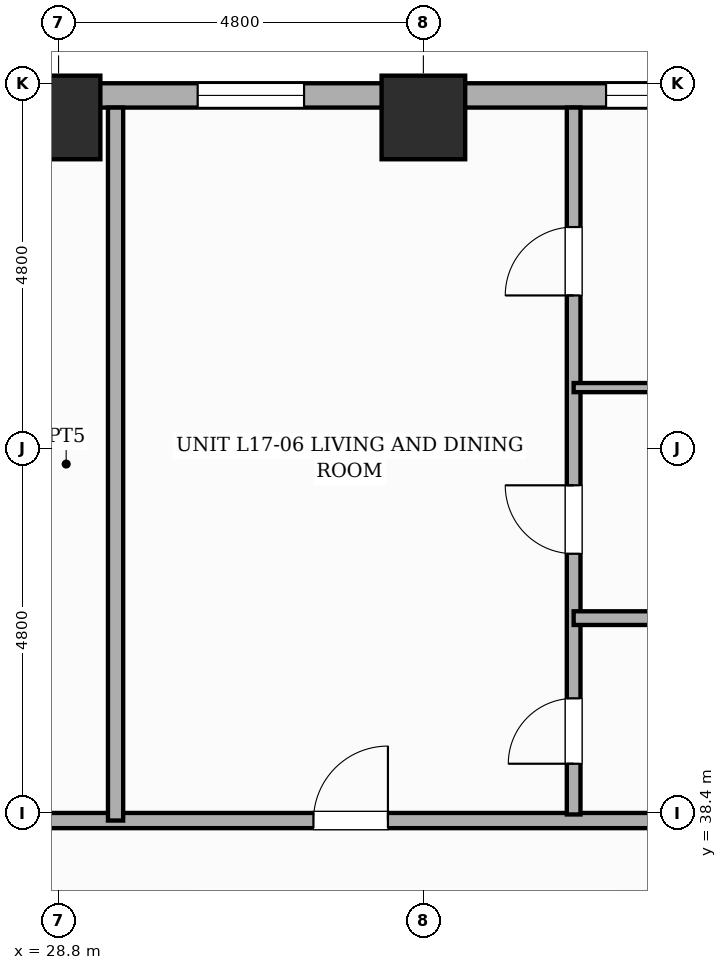
"""IFC4 building model, lengths in metres.
Left out: names, types, materials, properties, quantities, classifications, styles, units other than length and angle.
Written with IfcOpenShell. Run it as: python <this file> out.ifc"""

import sys

from ifc_helpers import new_model, si_unit, direction, frame, frame_2d, origin, origin_2d, place, context, subcontext, project, spatial, rectangle, extrude, element, fill, save


model = new_model("IFC4")
c1 = context("Model", 3, precision=1e-05, world=origin(), true_north=direction((0.0, 1.0)))
c2 = subcontext(c1, "Body", "Model", "MODEL_VIEW")
j1 = project(units=[si_unit("LENGTHUNIT", "METRE"), si_unit("PLANEANGLEUNIT", "RADIAN")], contexts=[c1])
p1 = place(None, origin())
s1 = spatial("IfcSite", under=j1, at=p1, CompositionType="ELEMENT")
p2 = place(p1, origin())
s2 = spatial("IfcBuilding", under=s1, at=p2, CompositionType="ELEMENT")
p3 = place(p2, frame((0.0, 0.0, 68.2)))
s3 = spatial("IfcBuildingStorey", under=s2, at=p3, CompositionType="ELEMENT", Elevation=68.2)
for number, where, z_axis, x_axis in (
    (1, (28.8, 47.55, 0.0), (0.0, 0.0, 1.0), (1.0, 0.0, 0.0)),
    (2, (33.6, 47.55, 0.0), (0.0, 0.0, 1.0), (1.0, 0.0, 0.0)),
):
    element("IfcColumn", number, at=place(p3, frame(where, z_axis=z_axis, x_axis=x_axis)), inside=s3, PredefinedType="COLUMN", context=c2, shape_type="SweptSolid", body=[
        extrude(rectangle(XDim=1.1, YDim=1.1, at=origin_2d()), origin(), (0.0, 0.0, 1.0), 3.6),
    ])
p4 = place(p3, frame((7.2, 47.84, 0.0), z_axis=(0.0, 0.0, 1.0), x_axis=(1.0, 0.0, 0.0)))
e3 = element("IfcWall", 3, at=p4, inside=s3, PredefinedType="STANDARD", context=c2, shape_type="SweptSolid", body=[
    extrude(rectangle(XDim=48.0, YDim=0.32, at=frame_2d((24.0, 0.0))), origin(), (0.0, 0.0, 1.0), 2.53),
])
p5 = place(p4, frame((28.803, 0.0, 0.65)))
e4 = element("IfcOpeningElement", 4, at=p5, cuts=e3, PredefinedType="OPENING", context=c2, shape_type="SweptSolid", body=[
    extrude(rectangle(XDim=1.4, YDim=1.1, at=frame_2d((0.7, 0.55))), frame((0.0, 0.17, 0.0), z_axis=(0.0, -1.0, 0.0), x_axis=(1.0, 0.0, 0.0)), (0.0, 0.0, 1.0), 0.34),
])
p6 = place(p4, frame((47.094, 0.0, 0.45)))
e5 = element("IfcOpeningElement", 5, at=p6, cuts=e3, PredefinedType="OPENING", context=c2, shape_type="SweptSolid", body=[
    extrude(rectangle(XDim=0.6, YDim=1.8, at=frame_2d((0.3, 0.9))), frame((0.0, 0.17, 0.0), z_axis=(0.0, -1.0, 0.0), x_axis=(1.0, 0.0, 0.0)), (0.0, 0.0, 1.0), 0.34),
])
p7 = place(p4, frame((18.74, 0.0, 0.45)))
e6 = element("IfcOpeningElement", 6, at=p7, cuts=e3, PredefinedType="OPENING", context=c2, shape_type="SweptSolid", body=[
    extrude(rectangle(XDim=0.95, YDim=1.8, at=frame_2d((0.475, 0.9))), frame((0.0, 0.17, 0.0), z_axis=(0.0, -1.0, 0.0), x_axis=(1.0, 0.0, 0.0)), (0.0, 0.0, 1.0), 0.34),
])
p8 = place(p4, frame((41.65, 0.0, 0.45)))
e7 = element("IfcOpeningElement", 7, at=p8, cuts=e3, PredefinedType="OPENING", context=c2, shape_type="SweptSolid", body=[
    extrude(rectangle(XDim=0.75, YDim=1.8, at=frame_2d((0.375, 0.9))), frame((0.0, 0.17, 0.0), z_axis=(0.0, -1.0, 0.0), x_axis=(1.0, 0.0, 0.0)), (0.0, 0.0, 1.0), 0.34),
])
p9 = place(p4, frame((37.736, 0.0, 0.65)))
e8 = element("IfcOpeningElement", 8, at=p9, cuts=e3, PredefinedType="OPENING", context=c2, shape_type="SweptSolid", body=[
    extrude(rectangle(XDim=1.4, YDim=1.1, at=frame_2d((0.7, 0.55))), frame((0.0, 0.17, 0.0), z_axis=(0.0, -1.0, 0.0), x_axis=(1.0, 0.0, 0.0)), (0.0, 0.0, 1.0), 0.34),
])
p10 = place(p4, frame((0.47, 0.0, 0.45)))
e9 = element("IfcOpeningElement", 9, at=p10, cuts=e3, PredefinedType="OPENING", context=c2, shape_type="SweptSolid", body=[
    extrude(rectangle(XDim=0.95, YDim=1.8, at=frame_2d((0.475, 0.9))), frame((0.0, 0.17, 0.0), z_axis=(0.0, -1.0, 0.0), x_axis=(1.0, 0.0, 0.0)), (0.0, 0.0, 1.0), 0.34),
])
p11 = place(p4, frame((10.215, 0.0, 0.45)))
e10 = element("IfcOpeningElement", 10, at=p11, cuts=e3, PredefinedType="OPENING", context=c2, shape_type="SweptSolid", body=[
    extrude(rectangle(XDim=0.95, YDim=1.8, at=frame_2d((0.475, 0.9))), frame((0.0, 0.17, 0.0), z_axis=(0.0, -1.0, 0.0), x_axis=(1.0, 0.0, 0.0)), (0.0, 0.0, 1.0), 0.34),
])
p12 = place(p4, frame((23.43, 0.0, 0.65)))
e11 = element("IfcOpeningElement", 11, at=p12, cuts=e3, PredefinedType="OPENING", context=c2, shape_type="SweptSolid", body=[
    extrude(rectangle(XDim=1.4, YDim=1.1, at=frame_2d((0.7, 0.55))), frame((0.0, 0.17, 0.0), z_axis=(0.0, -1.0, 0.0), x_axis=(1.0, 0.0, 0.0)), (0.0, 0.0, 1.0), 0.34),
])
p13 = place(p4, frame((42.95, 0.0, 0.65)))
e12 = element("IfcOpeningElement", 12, at=p13, cuts=e3, PredefinedType="OPENING", context=c2, shape_type="SweptSolid", body=[
    extrude(rectangle(XDim=1.4, YDim=1.1, at=frame_2d((0.7, 0.55))), frame((0.0, 0.17, 0.0), z_axis=(0.0, -1.0, 0.0), x_axis=(1.0, 0.0, 0.0)), (0.0, 0.0, 1.0), 0.34),
])
p14 = place(p4, frame((45.984, 0.0, 0.45)))
e13 = element("IfcOpeningElement", 13, at=p14, cuts=e3, PredefinedType="OPENING", context=c2, shape_type="SweptSolid", body=[
    extrude(rectangle(XDim=0.6, YDim=1.8, at=frame_2d((0.3, 0.9))), frame((0.0, 0.17, 0.0), z_axis=(0.0, -1.0, 0.0), x_axis=(1.0, 0.0, 0.0)), (0.0, 0.0, 1.0), 0.34),
])
p15 = place(p3, frame((27.35, 38.3, 0.0), z_axis=(0.0, 0.0, 1.0), x_axis=(1.0, 0.0, 0.0)))
e14 = element("IfcWall", 14, at=p15, inside=s3, PredefinedType="PARTITIONING", context=c2, shape_type="SweptSolid", body=[
    extrude(rectangle(XDim=14.43, YDim=0.2, at=frame_2d((7.215, 0.0))), origin(), (0.0, 0.0, 1.0), 3.35),
])
p16 = place(p15, frame((4.803, 0.0, 0.0)))
e15 = element("IfcOpeningElement", 15, at=p16, cuts=e14, PredefinedType="OPENING", context=c2, shape_type="SweptSolid", body=[
    extrude(rectangle(XDim=0.98, YDim=2.18, at=frame_2d((0.49, 1.09))), frame((0.0, 0.11, 0.0), z_axis=(0.0, -1.0, 0.0), x_axis=(1.0, 0.0, 0.0)), (0.0, 0.0, 1.0), 0.22),
])
p17 = place(p3, frame((29.55, 38.3, 0.0), z_axis=(0.0, 0.0, 1.0), x_axis=(0.0, 1.0, 0.0)))
e16 = element("IfcWall", 16, at=p17, inside=s3, PredefinedType="SOLIDWALL", context=c2, shape_type="SweptSolid", body=[
    extrude(rectangle(XDim=9.38, YDim=0.2, at=frame_2d((4.69, 0.0))), origin(), (0.0, 0.0, 1.0), 3.35),
])
p18 = place(p3, frame((35.577, 38.38, 0.0), z_axis=(0.0, 0.0, 1.0), x_axis=(0.0, 1.0, 0.0)))
e17 = element("IfcWall", 17, at=p18, inside=s3, PredefinedType="PLUMBINGWALL", context=c2, shape_type="SweptSolid", body=[
    extrude(rectangle(XDim=9.3, YDim=0.18, at=frame_2d((4.65, 0.0))), origin(), (0.0, 0.0, 1.0), 3.35),
])
p19 = place(p18, frame((0.667, 0.0, 0.0)))
e18 = element("IfcOpeningElement", 18, at=p19, cuts=e17, PredefinedType="OPENING", context=c2, shape_type="SweptSolid", body=[
    extrude(rectangle(XDim=0.86, YDim=2.1, at=frame_2d((0.43, 1.05))), frame((0.0, 0.1, 0.0), z_axis=(0.0, -1.0, 0.0), x_axis=(1.0, 0.0, 0.0)), (0.0, 0.0, 1.0), 0.2),
])
p20 = place(p18, frame((3.43, 0.0, 0.0)))
e19 = element("IfcOpeningElement", 19, at=p20, cuts=e17, PredefinedType="OPENING", context=c2, shape_type="SweptSolid", body=[
    extrude(rectangle(XDim=0.9, YDim=2.15, at=frame_2d((0.45, 1.075))), frame((0.0, 0.1, 0.0), z_axis=(0.0, -1.0, 0.0), x_axis=(1.0, 0.0, 0.0)), (0.0, 0.0, 1.0), 0.2),
])
p21 = place(p18, frame((6.828, 0.0, 0.0)))
e20 = element("IfcOpeningElement", 20, at=p21, cuts=e17, PredefinedType="OPENING", context=c2, shape_type="SweptSolid", body=[
    extrude(rectangle(XDim=0.9, YDim=2.15, at=frame_2d((0.45, 1.075))), frame((0.0, 0.1, 0.0), z_axis=(0.0, -1.0, 0.0), x_axis=(1.0, 0.0, 0.0)), (0.0, 0.0, 1.0), 0.2),
])
p22 = place(p3, frame((35.577, 40.963, 0.0), z_axis=(0.0, 0.0, 1.0), x_axis=(1.0, 0.0, 0.0)))
e21 = element("IfcWall", 21, at=p22, inside=s3, PredefinedType="PLUMBINGWALL", context=c2, shape_type="SweptSolid", body=[
    extrude(rectangle(XDim=6.123, YDim=0.18, at=frame_2d((3.062, 0.0))), origin(), (0.0, 0.0, 1.0), 3.35),
])
p23 = place(p3, frame((35.577, 43.996, 0.0), z_axis=(0.0, 0.0, 1.0), x_axis=(1.0, 0.0, 0.0)))
e22 = element("IfcWall", 22, at=p23, inside=s3, PredefinedType="PARTITIONING", context=c2, shape_type="SweptSolid", body=[
    extrude(rectangle(XDim=6.123, YDim=0.12, at=frame_2d((3.062, 0.0))), origin(), (0.0, 0.0, 1.0), 3.35),
])
p24 = place(p5, origin())
e23 = element("IfcWindow", 23, at=p24, inside=s3, PartitioningType="SINGLE_PANEL", PredefinedType="WINDOW", context=c2, shape_type="SweptSolid", body=[
    extrude(rectangle(XDim=1.4, YDim=1.1, at=frame_2d((0.7, 0.55))), frame((0.0, 0.03, 0.0), z_axis=(0.0, -1.0, 0.0), x_axis=(1.0, 0.0, 0.0)), (0.0, 0.0, 1.0), 0.06),
])
fill(e4, e23)
p25 = place(p12, origin())
e24 = element("IfcWindow", 24, at=p25, inside=s3, PartitioningType="SINGLE_PANEL", PredefinedType="WINDOW", context=c2, shape_type="SweptSolid", body=[
    extrude(rectangle(XDim=1.4, YDim=1.1, at=frame_2d((0.7, 0.55))), frame((0.0, 0.03, 0.0), z_axis=(0.0, -1.0, 0.0), x_axis=(1.0, 0.0, 0.0)), (0.0, 0.0, 1.0), 0.06),
])
fill(e11, e24)
p26 = place(p16, origin())
e25 = element("IfcDoor", 25, at=p26, inside=s3, OperationType="SINGLE_SWING_RIGHT", PredefinedType="DOOR", context=c2, shape_type="SweptSolid", body=[
    extrude(rectangle(XDim=0.98, YDim=2.18, at=frame_2d((0.49, 1.09))), frame((0.0, 0.025, 0.0), z_axis=(0.0, -1.0, 0.0), x_axis=(1.0, 0.0, 0.0)), (0.0, 0.0, 1.0), 0.05),
])
fill(e15, e25)
p27 = place(p19, origin())
e26 = element("IfcDoor", 26, at=p27, inside=s3, OperationType="SINGLE_SWING_LEFT", PredefinedType="DOOR", context=c2, shape_type="SweptSolid", body=[
    extrude(rectangle(XDim=0.86, YDim=2.1, at=frame_2d((0.43, 1.05))), frame((0.0, 0.025, 0.0), z_axis=(0.0, -1.0, 0.0), x_axis=(1.0, 0.0, 0.0)), (0.0, 0.0, 1.0), 0.05),
])
fill(e18, e26)
p28 = place(p20, origin())
e27 = element("IfcDoor", 27, at=p28, inside=s3, OperationType="SINGLE_SWING_RIGHT", PredefinedType="DOOR", context=c2, shape_type="SweptSolid", body=[
    extrude(rectangle(XDim=0.9, YDim=2.15, at=frame_2d((0.45, 1.075))), frame((0.0, 0.025, 0.0), z_axis=(0.0, -1.0, 0.0), x_axis=(1.0, 0.0, 0.0)), (0.0, 0.0, 1.0), 0.05),
])
fill(e19, e27)
p29 = place(p21, origin())
e28 = element("IfcDoor", 28, at=p29, inside=s3, OperationType="SINGLE_SWING_LEFT", PredefinedType="DOOR", context=c2, shape_type="SweptSolid", body=[
    extrude(rectangle(XDim=0.9, YDim=2.15, at=frame_2d((0.45, 1.075))), frame((0.0, 0.025, 0.0), z_axis=(0.0, -1.0, 0.0), x_axis=(1.0, 0.0, 0.0)), (0.0, 0.0, 1.0), 0.05),
])
fill(e20, e28)
save(model, sys.argv[1])
